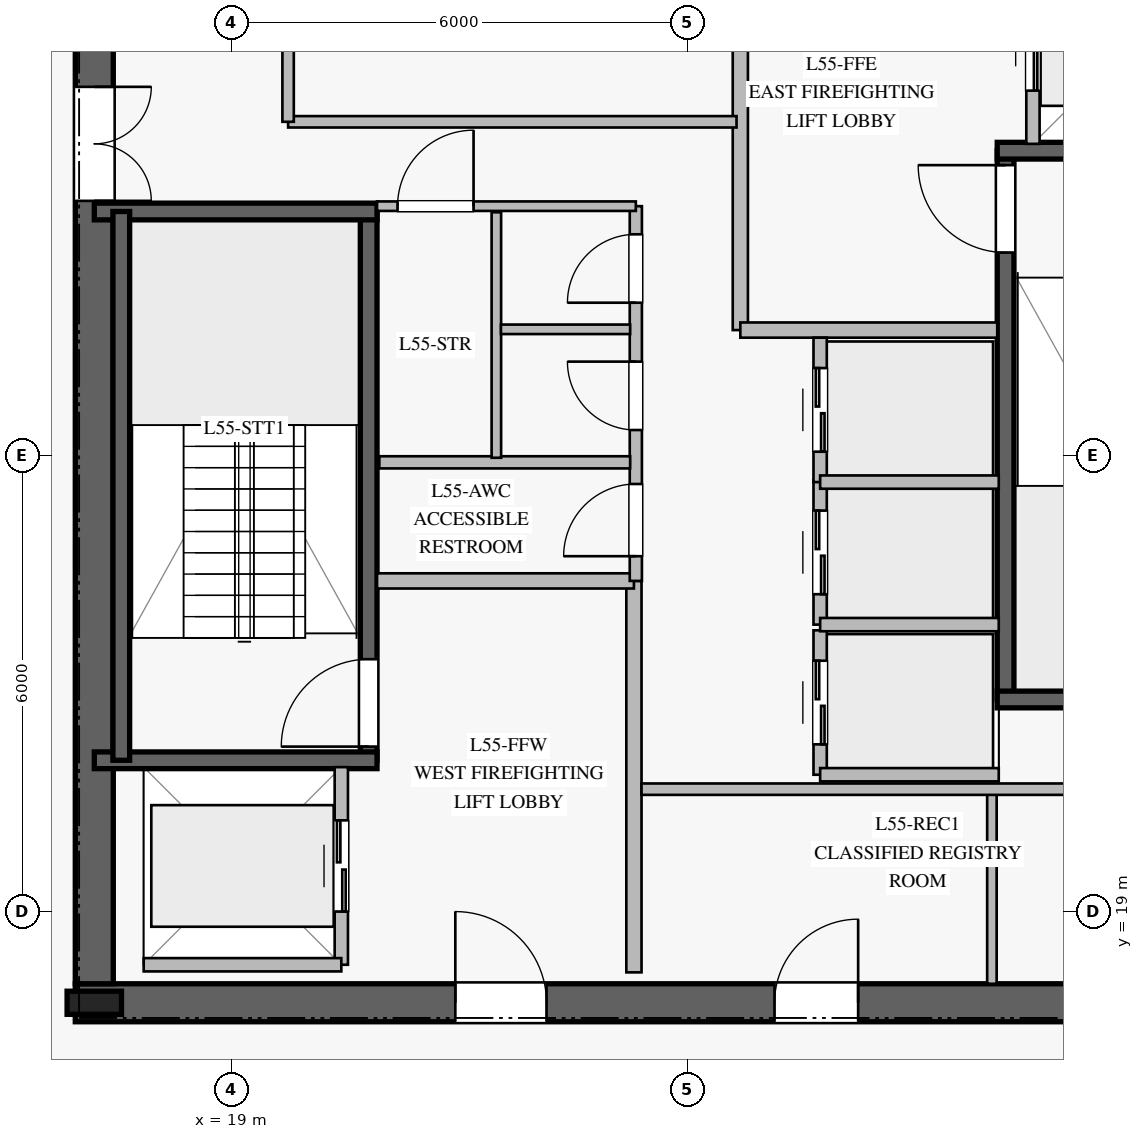
"""IFC4 building model, lengths in metres.
Left out: names, types, materials, properties, quantities, classifications, styles, units other than length and angle.
Written with IfcOpenShell. Run it as: python <this file> out.ifc"""

import sys

from ifc_helpers import new_model, si_unit, direction, frame, frame_2d, origin, origin_2d, place, context, subcontext, project, spatial, rectangle, i_section, extrude, element, fill, save


model = new_model("IFC4")
c1 = context("Model", 3, precision=1e-05, world=origin(), true_north=direction((0.0, 1.0)))
c2 = subcontext(c1, "Body", "Model", "MODEL_VIEW")
j1 = project(units=[si_unit("LENGTHUNIT", "METRE"), si_unit("PLANEANGLEUNIT", "RADIAN")], contexts=[c1])
p1 = place(None, origin())
s1 = spatial("IfcSite", under=j1, at=p1, CompositionType="ELEMENT")
p2 = place(p1, origin())
s2 = spatial("IfcBuilding", under=s1, at=p2, CompositionType="ELEMENT")
p3 = place(p2, frame((0.0, 0.0, 228.8)))
s3 = spatial("IfcBuildingStorey", under=s2, at=p3, CompositionType="ELEMENT", Elevation=228.8)
p4 = place(p3, frame((16.95, 17.8, 0.0), z_axis=(0.0, 0.0, 1.0), x_axis=(1.0, 0.0, 0.0)))
e1 = element("IfcWall", 1, at=p4, inside=s3, PredefinedType="SHEAR", context=c2, shape_type="SweptSolid", body=[
    extrude(rectangle(XDim=16.1, YDim=0.5, at=frame_2d((8.05, 0.0))), origin(), (0.0, 0.0, 1.0), 3.78),
])
p5 = place(p4, frame((5.0, 0.0, 0.0)))
e2 = element("IfcOpeningElement", 2, at=p5, cuts=e1, PredefinedType="OPENING", context=c2, shape_type="SweptSolid", body=[
    extrude(rectangle(XDim=1.2, YDim=2.25, at=frame_2d((0.6, 1.125))), frame((0.0, 0.26, 0.0), z_axis=(0.0, -1.0, 0.0), x_axis=(1.0, 0.0, 0.0)), (0.0, 0.0, 1.0), 0.52),
])
p6 = place(p4, frame((13.95, 0.0, 0.0)))
e3 = element("IfcOpeningElement", 3, at=p6, cuts=e1, PredefinedType="OPENING", context=c2, shape_type="SweptSolid", body=[
    extrude(rectangle(XDim=0.9, YDim=2.1, at=frame_2d((0.45, 1.05))), frame((0.0, 0.26, 0.0), z_axis=(0.0, -1.0, 0.0), x_axis=(1.0, 0.0, 0.0)), (0.0, 0.0, 1.0), 0.52),
])
p7 = place(p4, frame((9.2, 0.0, 0.0)))
e4 = element("IfcOpeningElement", 4, at=p7, cuts=e1, PredefinedType="OPENING", context=c2, shape_type="SweptSolid", body=[
    extrude(rectangle(XDim=1.1, YDim=2.2, at=frame_2d((0.55, 1.1))), frame((0.0, 0.26, 0.0), z_axis=(0.0, -1.0, 0.0), x_axis=(1.0, 0.0, 0.0)), (0.0, 0.0, 1.0), 0.52),
])
p8 = place(p3, frame((17.2, 31.95, 0.0), z_axis=(0.0, 0.0, 1.0), x_axis=(0.0, -1.0, 0.0)))
e5 = element("IfcWall", 5, at=p8, inside=s3, PredefinedType="SHEAR", context=c2, shape_type="SweptSolid", body=[
    extrude(rectangle(XDim=13.9, YDim=0.5, at=frame_2d((6.95, 0.0))), origin(), (0.0, 0.0, 1.0), 3.78),
])
p9 = place(p8, frame((2.1, 0.0, 0.0)))
e6 = element("IfcOpeningElement", 6, at=p9, cuts=e5, PredefinedType="OPENING", context=c2, shape_type="SweptSolid", body=[
    extrude(rectangle(XDim=1.5, YDim=2.2, at=frame_2d((0.75, 1.1))), frame((0.0, 0.26, 0.0), z_axis=(0.0, -1.0, 0.0), x_axis=(1.0, 0.0, 0.0)), (0.0, 0.0, 1.0), 0.52),
])
p10 = place(p3, frame((17.2, 17.8, 0.0), z_axis=(0.0, 0.0, 1.0), x_axis=(1.0, 0.0, 0.0)))
e7 = element("IfcColumn", 7, at=p10, inside=s3, PredefinedType="COLUMN", context=c2, shape_type="SweptSolid", body=[
    extrude(i_section(OverallWidth=0.304, OverallDepth=0.716, WebThickness=0.021, FlangeThickness=0.04, at=origin_2d()), origin(), (0.0, 0.0, 1.0), 4.0),
])
p11 = place(p3, frame((20.81, 20.99, 0.0), z_axis=(0.0, 0.0, 1.0), x_axis=(0.0, 1.0, 0.0)))
e8 = element("IfcWall", 8, at=p11, inside=s3, PredefinedType="SOLIDWALL", context=c2, shape_type="SweptSolid", body=[
    extrude(rectangle(XDim=7.22, YDim=0.22, at=frame_2d((3.61, 0.0))), origin(), (0.0, 0.0, 1.0), 3.78),
])
p12 = place(p11, frame((0.18, 0.0, 0.0)))
e9 = element("IfcOpeningElement", 9, at=p12, cuts=e8, PredefinedType="OPENING", context=c2, shape_type="SweptSolid", body=[
    extrude(rectangle(XDim=1.15, YDim=2.2, at=frame_2d((0.575, 1.1))), frame((0.0, 0.12, 0.0), z_axis=(0.0, -1.0, 0.0), x_axis=(1.0, 0.0, 0.0)), (0.0, 0.0, 1.0), 0.24),
])
for number, where, z_axis, x_axis in (
    (10, (17.2, 20.99, 0.0), (0.0, 0.0, 1.0), (1.0, 0.0, 0.0)),
    (11, (17.2, 28.21, 0.0), (0.0, 0.0, 1.0), (1.0, 0.0, 0.0)),
):
    element("IfcWall", number, at=place(p3, frame(where, z_axis=z_axis, x_axis=x_axis)), inside=s3, PredefinedType="SOLIDWALL", context=c2, shape_type="SweptSolid", body=[
        extrude(rectangle(XDim=3.72, YDim=0.22, at=frame_2d((1.86, 0.0))), origin(), (0.0, 0.0, 1.0), 3.78),
    ])
p13 = place(p3, frame((17.555, 28.21, 0.0), z_axis=(0.0, 0.0, 1.0), x_axis=(0.0, -1.0, 0.0)))
e12 = element("IfcWall", 12, at=p13, inside=s3, PredefinedType="SOLIDWALL", context=c2, shape_type="SweptSolid", body=[
    extrude(rectangle(XDim=7.22, YDim=0.22, at=frame_2d((3.61, 0.0))), origin(), (0.0, 0.0, 1.0), 3.78),
])
p14 = place(p3, frame((29.19, 21.79, 0.0), z_axis=(0.0, 0.0, 1.0), x_axis=(0.0, 1.0, 0.0)))
e13 = element("IfcWall", 13, at=p14, inside=s3, PredefinedType="SOLIDWALL", context=c2, shape_type="SweptSolid", body=[
    extrude(rectangle(XDim=7.22, YDim=0.22, at=frame_2d((3.61, 0.0))), origin(), (0.0, 0.0, 1.0), 3.78),
])
p15 = place(p14, frame((5.88, 0.0, 0.0)))
e14 = element("IfcOpeningElement", 14, at=p15, cuts=e13, PredefinedType="OPENING", context=c2, shape_type="SweptSolid", body=[
    extrude(rectangle(XDim=1.15, YDim=2.2, at=frame_2d((0.575, 1.1))), frame((0.0, 0.12, 0.0), z_axis=(0.0, -1.0, 0.0), x_axis=(1.0, 0.0, 0.0)), (0.0, 0.0, 1.0), 0.24),
])
for number, where, z_axis, x_axis in (
    (15, (29.08, 21.79, 0.0), (0.0, 0.0, 1.0), (1.0, 0.0, 0.0)),
    (16, (29.08, 29.01, 0.0), (0.0, 0.0, 1.0), (1.0, 0.0, 0.0)),
):
    element("IfcWall", number, at=place(p3, frame(where, z_axis=z_axis, x_axis=x_axis)), inside=s3, PredefinedType="SOLIDWALL", context=c2, shape_type="SweptSolid", body=[
        extrude(rectangle(XDim=3.72, YDim=0.22, at=frame_2d((1.86, 0.0))), origin(), (0.0, 0.0, 1.0), 3.78),
    ])
p16 = place(p3, frame((24.3, 18.2, 0.0), z_axis=(0.0, 0.0, 1.0), x_axis=(0.0, 1.0, 0.0)))
e17 = element("IfcWall", 17, at=p16, inside=s3, PredefinedType="PARTITIONING", context=c2, shape_type="SweptSolid", body=[
    extrude(rectangle(XDim=5.15, YDim=0.2, at=frame_2d((2.575, 0.0))), origin(), (0.0, 0.0, 1.0), 3.78),
])
p17 = place(p3, frame((20.92, 23.35, 0.0), z_axis=(0.0, 0.0, 1.0), x_axis=(1.0, 0.0, 0.0)))
e18 = element("IfcWall", 18, at=p17, inside=s3, PredefinedType="PARTITIONING", context=c2, shape_type="SweptSolid", body=[
    extrude(rectangle(XDim=3.38, YDim=0.2, at=frame_2d((1.69, 0.0))), origin(), (0.0, 0.0, 1.0), 3.78),
])
p18 = place(p3, frame((25.7, 26.65, 0.0), z_axis=(0.0, 0.0, 1.0), x_axis=(0.0, 1.0, 0.0)))
e19 = element("IfcWall", 19, at=p18, inside=s3, PredefinedType="PARTITIONING", context=c2, shape_type="SweptSolid", body=[
    extrude(rectangle(XDim=5.15, YDim=0.2, at=frame_2d((2.575, 0.0))), origin(), (0.0, 0.0, 1.0), 3.78),
])
p19 = place(p3, frame((25.7, 26.65, 0.0), z_axis=(0.0, 0.0, 1.0), x_axis=(1.0, 0.0, 0.0)))
e20 = element("IfcWall", 20, at=p19, inside=s3, PredefinedType="PARTITIONING", context=c2, shape_type="SweptSolid", body=[
    extrude(rectangle(XDim=3.38, YDim=0.2, at=frame_2d((1.69, 0.0))), origin(), (0.0, 0.0, 1.0), 3.78),
])
p20 = place(p3, frame((24.325, 23.35, 0.0), z_axis=(0.0, 0.0, 1.0), x_axis=(0.0, 1.0, 0.0)))
e21 = element("IfcWall", 21, at=p20, inside=s3, PredefinedType="PLUMBINGWALL", context=c2, shape_type="SweptSolid", body=[
    extrude(rectangle(XDim=4.93, YDim=0.16, at=frame_2d((2.465, 0.0))), origin(), (0.0, 0.0, 1.0), 3.78),
])
p21 = place(p20, frame((0.325, 0.0, 0.0)))
e22 = element("IfcOpeningElement", 22, at=p21, cuts=e21, PredefinedType="OPENING", context=c2, shape_type="SweptSolid", body=[
    extrude(rectangle(XDim=0.95, YDim=2.1, at=frame_2d((0.475, 1.05))), frame((0.0, 0.09, 0.0), z_axis=(0.0, -1.0, 0.0), x_axis=(1.0, 0.0, 0.0)), (0.0, 0.0, 1.0), 0.18),
])
p22 = place(p20, frame((1.985, 0.0, 0.0)))
e23 = element("IfcOpeningElement", 23, at=p22, cuts=e21, PredefinedType="OPENING", context=c2, shape_type="SweptSolid", body=[
    extrude(rectangle(XDim=0.9, YDim=2.1, at=frame_2d((0.45, 1.05))), frame((0.0, 0.09, 0.0), z_axis=(0.0, -1.0, 0.0), x_axis=(1.0, 0.0, 0.0)), (0.0, 0.0, 1.0), 0.18),
])
p23 = place(p20, frame((3.66, 0.0, 0.0)))
e24 = element("IfcOpeningElement", 24, at=p23, cuts=e21, PredefinedType="OPENING", context=c2, shape_type="SweptSolid", body=[
    extrude(rectangle(XDim=0.9, YDim=2.1, at=frame_2d((0.45, 1.05))), frame((0.0, 0.09, 0.0), z_axis=(0.0, -1.0, 0.0), x_axis=(1.0, 0.0, 0.0)), (0.0, 0.0, 1.0), 0.18),
])
p24 = place(p3, frame((20.92, 28.28, 0.0), z_axis=(0.0, 0.0, 1.0), x_axis=(1.0, 0.0, 0.0)))
e25 = element("IfcWall", 25, at=p24, inside=s3, PredefinedType="PARTITIONING", context=c2, shape_type="SweptSolid", body=[
    extrude(rectangle(XDim=3.405, YDim=0.125, at=frame_2d((1.703, 0.0))), origin(), (0.0, 0.0, 1.0), 3.78),
])
p25 = place(p24, frame((0.27, 0.0, 0.0)))
e26 = element("IfcOpeningElement", 26, at=p25, cuts=e25, PredefinedType="OPENING", context=c2, shape_type="SweptSolid", body=[
    extrude(rectangle(XDim=1.0, YDim=2.15, at=frame_2d((0.5, 1.075))), frame((0.0, 0.073, 0.0), z_axis=(0.0, -1.0, 0.0), x_axis=(1.0, 0.0, 0.0)), (0.0, 0.0, 1.0), 0.145),
])
p26 = place(p3, frame((29.01, 18.05, 0.0), z_axis=(0.0, 0.0, 1.0), x_axis=(0.0, 1.0, 0.0)))
e27 = element("IfcWall", 27, at=p26, inside=s3, PredefinedType="PARTITIONING", context=c2, shape_type="SweptSolid", body=[
    extrude(rectangle(XDim=2.5, YDim=0.125, at=frame_2d((1.25, 0.0))), origin(), (0.0, 0.0, 1.0), 3.78),
])
p27 = place(p3, frame((20.95, 24.91, 0.0), z_axis=(0.0, 0.0, 1.0), x_axis=(1.0, 0.0, 0.0)))
e28 = element("IfcWall", 28, at=p27, inside=s3, PredefinedType="PLUMBINGWALL", context=c2, shape_type="SweptSolid", body=[
    extrude(rectangle(XDim=3.3, YDim=0.16, at=frame_2d((1.65, 0.0))), origin(), (0.0, 0.0, 1.0), 3.78),
])
p28 = place(p3, frame((22.49, 24.97, 0.0), z_axis=(0.0, 0.0, 1.0), x_axis=(0.0, 1.0, 0.0)))
e29 = element("IfcWall", 29, at=p28, inside=s3, PredefinedType="PARTITIONING", context=c2, shape_type="SweptSolid", body=[
    extrude(rectangle(XDim=3.23, YDim=0.125, at=frame_2d((1.615, 0.0))), origin(), (0.0, 0.0, 1.0), 3.78),
])
p29 = place(p3, frame((22.55, 26.66, 0.0), z_axis=(0.0, 0.0, 1.0), x_axis=(1.0, 0.0, 0.0)))
e30 = element("IfcWall", 30, at=p29, inside=s3, PredefinedType="PARTITIONING", context=c2, shape_type="SweptSolid", body=[
    extrude(rectangle(XDim=1.7, YDim=0.125, at=frame_2d((0.85, 0.0))), origin(), (0.0, 0.0, 1.0), 3.78),
])
p30 = place(p3, frame((24.4, 20.61, 0.0), z_axis=(0.0, 0.0, 1.0), x_axis=(1.0, 0.0, 0.0)))
e31 = element("IfcWall", 31, at=p30, inside=s3, PredefinedType="PARTITIONING", context=c2, shape_type="SweptSolid", body=[
    extrude(rectangle(XDim=5.9, YDim=0.15, at=frame_2d((2.95, 0.0))), origin(), (0.0, 0.0, 1.0), 3.78),
])
p31 = place(p3, frame((19.75, 29.39, 0.0), z_axis=(0.0, 0.0, 1.0), x_axis=(1.0, 0.0, 0.0)))
e32 = element("IfcWall", 32, at=p31, inside=s3, PredefinedType="PARTITIONING", context=c2, shape_type="SweptSolid", body=[
    extrude(rectangle(XDim=5.9, YDim=0.15, at=frame_2d((2.95, 0.0))), origin(), (0.0, 0.0, 1.0), 3.78),
])
p32 = place(p3, frame((19.75, 29.39, 0.0), z_axis=(0.0, 0.0, 1.0), x_axis=(0.0, 1.0, 0.0)))
e33 = element("IfcWall", 33, at=p32, inside=s3, PredefinedType="PARTITIONING", context=c2, shape_type="SweptSolid", body=[
    extrude(rectangle(XDim=2.41, YDim=0.15, at=frame_2d((1.205, 0.0))), origin(), (0.0, 0.0, 1.0), 3.78),
])
p33 = place(p3, frame((26.75, 20.8, 0.0), z_axis=(0.0, 0.0, 1.0), x_axis=(0.0, 1.0, 0.0)))
e34 = element("IfcWall", 34, at=p33, inside=s3, PredefinedType="PARTITIONING", context=c2, shape_type="SweptSolid", body=[
    extrude(rectangle(XDim=1.9, YDim=0.175, at=frame_2d((0.95, 0.0))), origin(), (0.0, 0.0, 1.0), 3.78),
])
p34 = place(p33, frame((0.4, 0.0, 0.0)))
e35 = element("IfcOpeningElement", 35, at=p34, cuts=e34, PredefinedType="OPENING", context=c2, shape_type="SweptSolid", body=[
    extrude(rectangle(XDim=1.1, YDim=2.2, at=frame_2d((0.55, 1.1))), frame((0.0, 0.098, 0.0), z_axis=(0.0, -1.0, 0.0), x_axis=(1.0, 0.0, 0.0)), (0.0, 0.0, 1.0), 0.195),
])
p35 = place(p3, frame((26.75, 20.8, 0.0), z_axis=(0.0, 0.0, 1.0), x_axis=(1.0, 0.0, 0.0)))
e36 = element("IfcWall", 36, at=p35, inside=s3, PredefinedType="PARTITIONING", context=c2, shape_type="SweptSolid", body=[
    extrude(rectangle(XDim=2.35, YDim=0.175, at=frame_2d((1.175, 0.0))), origin(), (0.0, 0.0, 1.0), 3.78),
])
p36 = place(p3, frame((26.75, 22.775, 0.0), z_axis=(0.0, 0.0, 1.0), x_axis=(0.0, 1.0, 0.0)))
e37 = element("IfcWall", 37, at=p36, inside=s3, PredefinedType="PARTITIONING", context=c2, shape_type="SweptSolid", body=[
    extrude(rectangle(XDim=1.9, YDim=0.175, at=frame_2d((0.95, 0.0))), origin(), (0.0, 0.0, 1.0), 3.78),
])
p37 = place(p36, frame((0.4, 0.0, 0.0)))
e38 = element("IfcOpeningElement", 38, at=p37, cuts=e37, PredefinedType="OPENING", context=c2, shape_type="SweptSolid", body=[
    extrude(rectangle(XDim=1.1, YDim=2.2, at=frame_2d((0.55, 1.1))), frame((0.0, 0.098, 0.0), z_axis=(0.0, -1.0, 0.0), x_axis=(1.0, 0.0, 0.0)), (0.0, 0.0, 1.0), 0.195),
])
p38 = place(p3, frame((26.75, 22.775, 0.0), z_axis=(0.0, 0.0, 1.0), x_axis=(1.0, 0.0, 0.0)))
e39 = element("IfcWall", 39, at=p38, inside=s3, PredefinedType="PARTITIONING", context=c2, shape_type="SweptSolid", body=[
    extrude(rectangle(XDim=2.35, YDim=0.175, at=frame_2d((1.175, 0.0))), origin(), (0.0, 0.0, 1.0), 3.78),
])
p39 = place(p3, frame((26.75, 24.65, 0.0), z_axis=(0.0, 0.0, 1.0), x_axis=(0.0, 1.0, 0.0)))
e40 = element("IfcWall", 40, at=p39, inside=s3, PredefinedType="PARTITIONING", context=c2, shape_type="SweptSolid", body=[
    extrude(rectangle(XDim=1.9, YDim=0.175, at=frame_2d((0.95, 0.0))), origin(), (0.0, 0.0, 1.0), 3.78),
])
p40 = place(p39, frame((0.4, 0.0, 0.0)))
e41 = element("IfcOpeningElement", 41, at=p40, cuts=e40, PredefinedType="OPENING", context=c2, shape_type="SweptSolid", body=[
    extrude(rectangle(XDim=1.1, YDim=2.2, at=frame_2d((0.55, 1.1))), frame((0.0, 0.098, 0.0), z_axis=(0.0, -1.0, 0.0), x_axis=(1.0, 0.0, 0.0)), (0.0, 0.0, 1.0), 0.195),
])
p41 = place(p3, frame((26.75, 24.65, 0.0), z_axis=(0.0, 0.0, 1.0), x_axis=(1.0, 0.0, 0.0)))
e42 = element("IfcWall", 42, at=p41, inside=s3, PredefinedType="PARTITIONING", context=c2, shape_type="SweptSolid", body=[
    extrude(rectangle(XDim=2.35, YDim=0.175, at=frame_2d((1.175, 0.0))), origin(), (0.0, 0.0, 1.0), 3.78),
])
p42 = place(p3, frame((20.45, 18.3, 0.0), z_axis=(0.0, 0.0, 1.0), x_axis=(0.0, 1.0, 0.0)))
e43 = element("IfcWall", 43, at=p42, inside=s3, PredefinedType="PARTITIONING", context=c2, shape_type="SweptSolid", body=[
    extrude(rectangle(XDim=2.6, YDim=0.175, at=frame_2d((1.3, 0.0))), origin(), (0.0, 0.0, 1.0), 3.78),
])
p43 = place(p42, frame((0.7, 0.0, 0.0)))
e44 = element("IfcOpeningElement", 44, at=p43, cuts=e43, PredefinedType="OPENING", context=c2, shape_type="SweptSolid", body=[
    extrude(rectangle(XDim=1.2, YDim=2.2, at=frame_2d((0.6, 1.1))), frame((0.0, 0.098, 0.0), z_axis=(0.0, -1.0, 0.0), x_axis=(1.0, 0.0, 0.0)), (0.0, 0.0, 1.0), 0.195),
])
p44 = place(p3, frame((17.85, 18.3, 0.0), z_axis=(0.0, 0.0, 1.0), x_axis=(1.0, 0.0, 0.0)))
e45 = element("IfcWall", 45, at=p44, inside=s3, PredefinedType="PARTITIONING", context=c2, shape_type="SweptSolid", body=[
    extrude(rectangle(XDim=2.6, YDim=0.175, at=frame_2d((1.3, 0.0))), origin(), (0.0, 0.0, 1.0), 3.78),
])
p45 = place(p3, frame((29.55, 29.1, 0.0), z_axis=(0.0, 0.0, 1.0), x_axis=(0.0, 1.0, 0.0)))
e46 = element("IfcWall", 46, at=p45, inside=s3, PredefinedType="PARTITIONING", context=c2, shape_type="SweptSolid", body=[
    extrude(rectangle(XDim=2.6, YDim=0.175, at=frame_2d((1.3, 0.0))), origin(), (0.0, 0.0, 1.0), 3.78),
])
p46 = place(p45, frame((0.7, 0.0, 0.0)))
e47 = element("IfcOpeningElement", 47, at=p46, cuts=e46, PredefinedType="OPENING", context=c2, shape_type="SweptSolid", body=[
    extrude(rectangle(XDim=1.2, YDim=2.2, at=frame_2d((0.6, 1.1))), frame((0.0, 0.098, 0.0), z_axis=(0.0, -1.0, 0.0), x_axis=(1.0, 0.0, 0.0)), (0.0, 0.0, 1.0), 0.195),
])
p47 = place(p12, origin())
e48 = element("IfcDoor", 48, at=p47, inside=s3, OperationType="SINGLE_SWING_LEFT", PredefinedType="DOOR", context=c2, shape_type="SweptSolid", body=[
    extrude(rectangle(XDim=1.15, YDim=2.2, at=frame_2d((0.575, 1.1))), frame((0.0, 0.025, 0.0), z_axis=(0.0, -1.0, 0.0), x_axis=(1.0, 0.0, 0.0)), (0.0, 0.0, 1.0), 0.05),
])
fill(e9, e48)
p48 = place(p15, origin())
e49 = element("IfcDoor", 49, at=p48, inside=s3, OperationType="SINGLE_SWING_RIGHT", PredefinedType="DOOR", context=c2, shape_type="SweptSolid", body=[
    extrude(rectangle(XDim=1.15, YDim=2.2, at=frame_2d((0.575, 1.1))), frame((0.0, 0.025, 0.0), z_axis=(0.0, -1.0, 0.0), x_axis=(1.0, 0.0, 0.0)), (0.0, 0.0, 1.0), 0.05),
])
fill(e14, e49)
p49 = place(p5, origin())
e50 = element("IfcDoor", 50, at=p49, inside=s3, OperationType="SINGLE_SWING_LEFT", PredefinedType="DOOR", context=c2, shape_type="SweptSolid", body=[
    extrude(rectangle(XDim=1.2, YDim=2.25, at=frame_2d((0.6, 1.125))), frame((0.0, 0.025, 0.0), z_axis=(0.0, -1.0, 0.0), x_axis=(1.0, 0.0, 0.0)), (0.0, 0.0, 1.0), 0.05),
])
fill(e2, e50)
p50 = place(p9, origin())
e51 = element("IfcDoor", 51, at=p50, inside=s3, OperationType="DOUBLE_DOOR_SINGLE_SWING", PredefinedType="DOOR", context=c2, shape_type="SweptSolid", body=[
    extrude(rectangle(XDim=1.5, YDim=2.2, at=frame_2d((0.75, 1.1))), frame((0.0, 0.025, 0.0), z_axis=(0.0, -1.0, 0.0), x_axis=(1.0, 0.0, 0.0)), (0.0, 0.0, 1.0), 0.05),
])
fill(e6, e51)
p51 = place(p21, origin())
e52 = element("IfcDoor", 52, at=p51, inside=s3, OperationType="SINGLE_SWING_LEFT", PredefinedType="DOOR", context=c2, shape_type="SweptSolid", body=[
    extrude(rectangle(XDim=0.95, YDim=2.1, at=frame_2d((0.475, 1.05))), frame((0.0, 0.025, 0.0), z_axis=(0.0, -1.0, 0.0), x_axis=(1.0, 0.0, 0.0)), (0.0, 0.0, 1.0), 0.05),
])
fill(e22, e52)
p52 = place(p22, origin())
e53 = element("IfcDoor", 53, at=p52, inside=s3, OperationType="SINGLE_SWING_RIGHT", PredefinedType="DOOR", context=c2, shape_type="SweptSolid", body=[
    extrude(rectangle(XDim=0.9, YDim=2.1, at=frame_2d((0.45, 1.05))), frame((0.0, 0.025, 0.0), z_axis=(0.0, -1.0, 0.0), x_axis=(1.0, 0.0, 0.0)), (0.0, 0.0, 1.0), 0.05),
])
fill(e23, e53)
p53 = place(p23, origin())
e54 = element("IfcDoor", 54, at=p53, inside=s3, OperationType="SINGLE_SWING_LEFT", PredefinedType="DOOR", context=c2, shape_type="SweptSolid", body=[
    extrude(rectangle(XDim=0.9, YDim=2.1, at=frame_2d((0.45, 1.05))), frame((0.0, 0.025, 0.0), z_axis=(0.0, -1.0, 0.0), x_axis=(1.0, 0.0, 0.0)), (0.0, 0.0, 1.0), 0.05),
])
fill(e24, e54)
p54 = place(p25, origin())
e55 = element("IfcDoor", 55, at=p54, inside=s3, OperationType="SINGLE_SWING_RIGHT", PredefinedType="DOOR", context=c2, shape_type="SweptSolid", body=[
    extrude(rectangle(XDim=1.0, YDim=2.15, at=frame_2d((0.5, 1.075))), frame((0.0, 0.025, 0.0), z_axis=(0.0, -1.0, 0.0), x_axis=(1.0, 0.0, 0.0)), (0.0, 0.0, 1.0), 0.05),
])
fill(e26, e55)
p55 = place(p7, origin())
e56 = element("IfcDoor", 56, at=p55, inside=s3, OperationType="SINGLE_SWING_RIGHT", PredefinedType="DOOR", context=c2, shape_type="SweptSolid", body=[
    extrude(rectangle(XDim=1.1, YDim=2.2, at=frame_2d((0.55, 1.1))), frame((0.0, 0.025, 0.0), z_axis=(0.0, -1.0, 0.0), x_axis=(1.0, 0.0, 0.0)), (0.0, 0.0, 1.0), 0.05),
])
fill(e4, e56)
p56 = place(p34, origin())
e57 = element("IfcDoor", 57, at=p56, inside=s3, OperationType="DOUBLE_DOOR_SLIDING", PredefinedType="DOOR", context=c2, shape_type="SweptSolid", body=[
    extrude(rectangle(XDim=1.1, YDim=2.2, at=frame_2d((0.55, 1.1))), frame((0.0, 0.025, 0.0), z_axis=(0.0, -1.0, 0.0), x_axis=(1.0, 0.0, 0.0)), (0.0, 0.0, 1.0), 0.05),
])
fill(e35, e57)
p57 = place(p37, origin())
e58 = element("IfcDoor", 58, at=p57, inside=s3, OperationType="DOUBLE_DOOR_SLIDING", PredefinedType="DOOR", context=c2, shape_type="SweptSolid", body=[
    extrude(rectangle(XDim=1.1, YDim=2.2, at=frame_2d((0.55, 1.1))), frame((0.0, 0.025, 0.0), z_axis=(0.0, -1.0, 0.0), x_axis=(1.0, 0.0, 0.0)), (0.0, 0.0, 1.0), 0.05),
])
fill(e38, e58)
p58 = place(p40, origin())
e59 = element("IfcDoor", 59, at=p58, inside=s3, OperationType="DOUBLE_DOOR_SLIDING", PredefinedType="DOOR", context=c2, shape_type="SweptSolid", body=[
    extrude(rectangle(XDim=1.1, YDim=2.2, at=frame_2d((0.55, 1.1))), frame((0.0, 0.025, 0.0), z_axis=(0.0, -1.0, 0.0), x_axis=(1.0, 0.0, 0.0)), (0.0, 0.0, 1.0), 0.05),
])
fill(e41, e59)
p59 = place(p43, origin())
e60 = element("IfcDoor", 60, at=p59, inside=s3, OperationType="DOUBLE_DOOR_SLIDING", PredefinedType="DOOR", context=c2, shape_type="SweptSolid", body=[
    extrude(rectangle(XDim=1.2, YDim=2.2, at=frame_2d((0.6, 1.1))), frame((0.0, 0.025, 0.0), z_axis=(0.0, -1.0, 0.0), x_axis=(1.0, 0.0, 0.0)), (0.0, 0.0, 1.0), 0.05),
])
fill(e44, e60)
p60 = place(p46, origin())
e61 = element("IfcDoor", 61, at=p60, inside=s3, OperationType="DOUBLE_DOOR_SLIDING", PredefinedType="DOOR", context=c2, shape_type="SweptSolid", body=[
    extrude(rectangle(XDim=1.2, YDim=2.2, at=frame_2d((0.6, 1.1))), frame((0.0, 0.025, 0.0), z_axis=(0.0, -1.0, 0.0), x_axis=(1.0, 0.0, 0.0)), (0.0, 0.0, 1.0), 0.05),
])
fill(e47, e61)
save(model, sys.argv[1])
